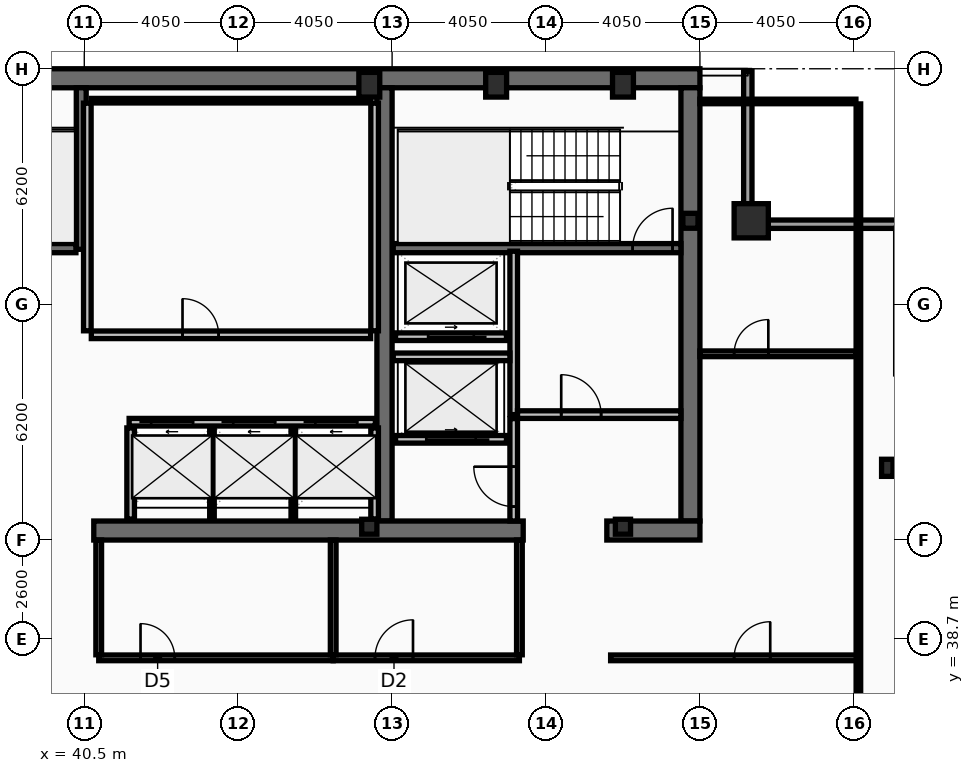
"""IFC4 building model, lengths in metres.
Left out: names, types, materials, properties, quantities, classifications, styles, units other than length and angle.
Written with IfcOpenShell. Run it as: python <this file> out.ifc"""

import sys

from ifc_helpers import new_model, si_unit, direction, frame, frame_2d, origin, origin_2d, place, context, subcontext, project, spatial, rectangle, hollow_rectangle, i_section, extrude, element, fill, save


model = new_model("IFC4")
c1 = context("Model", 3, precision=1e-05, world=origin(), true_north=direction((0.0, 1.0)))
c2 = subcontext(c1, "Body", "Model", "MODEL_VIEW")
j1 = project(units=[si_unit("LENGTHUNIT", "METRE"), si_unit("PLANEANGLEUNIT", "RADIAN")], contexts=[c1])
p1 = place(None, origin())
s1 = spatial("IfcSite", under=j1, at=p1, CompositionType="ELEMENT")
p2 = place(p1, origin())
s2 = spatial("IfcBuilding", under=s1, at=p2, CompositionType="ELEMENT")
p3 = place(p2, frame((0.0, 0.0, 321.8)))
s3 = spatial("IfcBuildingStorey", under=s2, at=p3, CompositionType="ELEMENT", Elevation=321.8)
p4 = place(p3, frame((16.2, 53.45, 0.0), z_axis=(0.0, 0.0, 1.0), x_axis=(1.0, 0.0, 0.0)))
e1 = element("IfcWall", 1, at=p4, inside=s3, PredefinedType="SHEAR", context=c2, shape_type="SweptSolid", body=[
    extrude(rectangle(XDim=40.5, YDim=0.5, at=frame_2d((20.25, 0.0))), origin(), (0.0, 0.0, 1.0), 3.44),
])
p5 = place(p3, frame((56.45, 53.2, 0.0), z_axis=(0.0, 0.0, 1.0), x_axis=(0.0, -1.0, 0.0)))
e2 = element("IfcWall", 2, at=p5, inside=s3, PredefinedType="SHEAR", context=c2, shape_type="SweptSolid", body=[
    extrude(rectangle(XDim=11.4, YDim=0.5, at=frame_2d((5.7, 0.0))), origin(), (0.0, 0.0, 1.0), 3.44),
])
p6 = place(p3, frame((48.4, 41.8, 0.0), z_axis=(0.0, 0.0, 1.0), x_axis=(0.0, 1.0, 0.0)))
e3 = element("IfcWall", 3, at=p6, inside=s3, PredefinedType="SHEAR", context=c2, shape_type="SweptSolid", body=[
    extrude(rectangle(XDim=11.4, YDim=0.4, at=frame_2d((5.7, 0.0))), origin(), (0.0, 0.0, 1.0), 3.44),
])
p7 = place(p3, frame((52.05, 41.55, 0.0), z_axis=(0.0, 0.0, 1.0), x_axis=(-1.0, 0.0, 0.0)))
e4 = element("IfcWall", 4, at=p7, inside=s3, PredefinedType="SHEAR", context=c2, shape_type="SweptSolid", body=[
    extrude(rectangle(XDim=11.3, YDim=0.5, at=frame_2d((5.65, 0.0))), origin(), (0.0, 0.0, 1.0), 3.44),
])
p8 = place(p3, frame((56.7, 41.55, 0.0), z_axis=(0.0, 0.0, 1.0), x_axis=(-1.0, 0.0, 0.0)))
e5 = element("IfcWall", 5, at=p8, inside=s3, PredefinedType="SHEAR", context=c2, shape_type="SweptSolid", body=[
    extrude(rectangle(XDim=2.45, YDim=0.5, at=frame_2d((1.225, 0.0))), origin(), (0.0, 0.0, 1.0), 3.44),
])
p9 = place(p3, frame((40.42, 48.95, 0.0), z_axis=(0.0, 0.0, 1.0), x_axis=(0.0, 1.0, 0.0)))
e6 = element("IfcWall", 6, at=p9, inside=s3, PredefinedType="SHEAR", context=c2, shape_type="SweptSolid", body=[
    extrude(rectangle(XDim=4.25, YDim=0.26, at=frame_2d((2.125, 0.0))), origin(), (0.0, 0.0, 1.0), 3.44),
])
p10 = place(p3, frame((48.63, 48.98, 0.0), z_axis=(0.0, 0.0, 1.0), x_axis=(1.0, 0.0, 0.0)))
e7 = element("IfcWall", 7, at=p10, inside=s3, PredefinedType="SHEAR", context=c2, shape_type="SweptSolid", body=[
    extrude(rectangle(XDim=7.57, YDim=0.24, at=frame_2d((3.785, 0.0))), origin(), (0.0, 0.0, 1.0), 3.44),
])
p11 = place(p10, frame((6.3, 0.0, 0.0)))
e8 = element("IfcOpeningElement", 8, at=p11, cuts=e7, PredefinedType="OPENING", context=c2, shape_type="SweptSolid", body=[
    extrude(rectangle(XDim=1.05, YDim=2.15, at=frame_2d((0.525, 1.075))), frame((0.0, 0.13, 0.0), z_axis=(0.0, -1.0, 0.0), x_axis=(1.0, 0.0, 0.0)), (0.0, 0.0, 1.0), 0.26),
])
p12 = place(p3, frame((32.72, 48.98, 0.0), z_axis=(0.0, 0.0, 1.0), x_axis=(1.0, 0.0, 0.0)))
e9 = element("IfcWall", 9, at=p12, inside=s3, PredefinedType="SHEAR", context=c2, shape_type="SweptSolid", body=[
    extrude(rectangle(XDim=7.56, YDim=0.24, at=frame_2d((3.78, 0.0))), origin(), (0.0, 0.0, 1.0), 3.44),
])
p13 = place(p12, frame((0.22, 0.0, 0.0)))
e10 = element("IfcOpeningElement", 10, at=p13, cuts=e9, PredefinedType="OPENING", context=c2, shape_type="SweptSolid", body=[
    extrude(rectangle(XDim=1.05, YDim=2.15, at=frame_2d((0.525, 1.075))), frame((0.0, 0.13, 0.0), z_axis=(0.0, -1.0, 0.0), x_axis=(1.0, 0.0, 0.0)), (0.0, 0.0, 1.0), 0.26),
])
p14 = place(p3, frame((58.05, 49.7, 0.0), z_axis=(0.0, 0.0, 1.0), x_axis=(1.0, 0.0, 0.0)))
e11 = element("IfcColumn", 11, at=p14, inside=s3, PredefinedType="COLUMN", context=c2, shape_type="SweptSolid", body=[
    extrude(hollow_rectangle(XDim=0.9, YDim=0.9, WallThickness=0.05, at=origin_2d()), origin(), (0.0, 0.0, 1.0), 3.6),
])
for number, where, z_axis, x_axis in (
    (12, (48.0, 53.28, 0.0), (0.0, 0.0, 1.0), (1.0, 0.0, 0.0)),
    (13, (51.337, 53.28, 0.0), (0.0, 0.0, 1.0), (1.0, 0.0, 0.0)),
    (14, (54.675, 53.28, 0.0), (0.0, 0.0, 1.0), (1.0, 0.0, 0.0)),
):
    element("IfcColumn", number, at=place(p3, frame(where, z_axis=z_axis, x_axis=x_axis)), inside=s3, PredefinedType="COLUMN", context=c2, shape_type="SweptSolid", body=[
        extrude(hollow_rectangle(XDim=0.55, YDim=0.65, WallThickness=0.04, at=origin_2d()), origin(), (0.0, 0.0, 1.0), 3.6),
    ])
p15 = place(p3, frame((61.63, 43.2, 0.0), z_axis=(0.0, 0.0, 1.0), x_axis=(1.0, 0.0, 0.0)))
e15 = element("IfcColumn", 15, at=p15, inside=s3, PredefinedType="COLUMN", context=c2, shape_type="SweptSolid", body=[
    extrude(i_section(OverallWidth=0.3, OverallDepth=0.45, WebThickness=0.014, FlangeThickness=0.026, at=origin_2d()), origin(), (0.0, 0.0, 1.0), 3.6),
])
for number, where, z_axis, x_axis in (
    (16, (56.45, 49.7, 0.0), (0.0, 0.0, 1.0), (1.0, 0.0, 0.0)),
    (17, (48.0, 41.65, 0.0), (0.0, 0.0, 1.0), (1.0, 0.0, 0.0)),
    (18, (54.675, 41.65, 0.0), (0.0, 0.0, 1.0), (1.0, 0.0, 0.0)),
):
    element("IfcColumn", number, at=place(p3, frame(where, z_axis=z_axis, x_axis=x_axis)), inside=s3, PredefinedType="COLUMN", context=c2, shape_type="SweptSolid", body=[
        extrude(i_section(OverallWidth=0.399, OverallDepth=0.393, WebThickness=0.023, FlangeThickness=0.037, at=origin_2d()), origin(), (0.0, 0.0, 1.0), 3.6),
    ])
p16 = place(p3, frame((57.96, 53.63, 0.0), z_axis=(0.0, 0.0, 1.0), x_axis=(0.0, -1.0, 0.0)))
e19 = element("IfcWall", 19, at=p16, inside=s3, PredefinedType="SOLIDWALL", context=c2, shape_type="SweptSolid", body=[
    extrude(rectangle(XDim=3.91, YDim=0.22, at=frame_2d((1.955, 0.0))), origin(), (0.0, 0.0, 1.0), 2.88),
])
p17 = place(p3, frame((57.85, 49.61, 0.0), z_axis=(0.0, 0.0, 1.0), x_axis=(1.0, 0.0, 0.0)))
e20 = element("IfcWall", 20, at=p17, inside=s3, PredefinedType="SOLIDWALL", context=c2, shape_type="SweptSolid", body=[
    extrude(rectangle(XDim=4.22, YDim=0.22, at=frame_2d((2.11, 0.0))), origin(), (0.0, 0.0, 1.0), 2.88),
])
p18 = place(p3, frame((41.68, 44.4, 0.0), z_axis=(0.0, 0.0, 1.0), x_axis=(1.0, 0.0, 0.0)))
e21 = element("IfcWall", 21, at=p18, inside=s3, PredefinedType="PARTITIONING", context=c2, shape_type="SweptSolid", body=[
    extrude(rectangle(XDim=6.48, YDim=0.2, at=frame_2d((3.24, 0.0))), origin(), (0.0, 0.0, 1.0), 3.44),
])
p19 = place(p18, frame((0.58, 0.0, 0.0)))
e22 = element("IfcOpeningElement", 22, at=p19, cuts=e21, PredefinedType="OPENING", context=c2, shape_type="SweptSolid", body=[
    extrude(rectangle(XDim=1.1, YDim=2.18, at=frame_2d((0.55, 1.09))), frame((0.0, 0.11, 0.0), z_axis=(0.0, -1.0, 0.0), x_axis=(1.0, 0.0, 0.0)), (0.0, 0.0, 1.0), 0.22),
])
p20 = place(p18, frame((2.74, 0.0, 0.0)))
e23 = element("IfcOpeningElement", 23, at=p20, cuts=e21, PredefinedType="OPENING", context=c2, shape_type="SweptSolid", body=[
    extrude(rectangle(XDim=1.1, YDim=2.18, at=frame_2d((0.55, 1.09))), frame((0.0, 0.11, 0.0), z_axis=(0.0, -1.0, 0.0), x_axis=(1.0, 0.0, 0.0)), (0.0, 0.0, 1.0), 0.22),
])
p21 = place(p18, frame((4.9, 0.0, 0.0)))
e24 = element("IfcOpeningElement", 24, at=p21, cuts=e21, PredefinedType="OPENING", context=c2, shape_type="SweptSolid", body=[
    extrude(rectangle(XDim=1.1, YDim=2.18, at=frame_2d((0.55, 1.09))), frame((0.0, 0.11, 0.0), z_axis=(0.0, -1.0, 0.0), x_axis=(1.0, 0.0, 0.0)), (0.0, 0.0, 1.0), 0.22),
])
p22 = place(p3, frame((51.61, 43.95, 0.0), z_axis=(0.0, 0.0, 1.0), x_axis=(-1.0, 0.0, 0.0)))
e25 = element("IfcWall", 25, at=p22, inside=s3, PredefinedType="PARTITIONING", context=c2, shape_type="SweptSolid", body=[
    extrude(rectangle(XDim=2.92, YDim=0.2, at=frame_2d((1.46, 0.0))), origin(), (0.0, 0.0, 1.0), 3.44),
])
p23 = place(p22, frame((0.81, 0.0, 0.0)))
e26 = element("IfcOpeningElement", 26, at=p23, cuts=e25, PredefinedType="OPENING", context=c2, shape_type="SweptSolid", body=[
    extrude(rectangle(XDim=1.3, YDim=2.18, at=frame_2d((0.65, 1.09))), frame((0.0, 0.11, 0.0), z_axis=(0.0, -1.0, 0.0), x_axis=(1.0, 0.0, 0.0)), (0.0, 0.0, 1.0), 0.22),
])
p24 = place(p3, frame((51.61, 46.65, 0.0), z_axis=(0.0, 0.0, 1.0), x_axis=(-1.0, 0.0, 0.0)))
e27 = element("IfcWall", 27, at=p24, inside=s3, PredefinedType="PARTITIONING", context=c2, shape_type="SweptSolid", body=[
    extrude(rectangle(XDim=2.92, YDim=0.2, at=frame_2d((1.46, 0.0))), origin(), (0.0, 0.0, 1.0), 3.44),
])
p25 = place(p24, frame((0.86, 0.0, 0.0)))
e28 = element("IfcOpeningElement", 28, at=p25, cuts=e27, PredefinedType="OPENING", context=c2, shape_type="SweptSolid", body=[
    extrude(rectangle(XDim=1.2, YDim=2.18, at=frame_2d((0.6, 1.09))), frame((0.0, 0.11, 0.0), z_axis=(0.0, -1.0, 0.0), x_axis=(1.0, 0.0, 0.0)), (0.0, 0.0, 1.0), 0.22),
])
p26 = place(p3, frame((51.8, 44.6, 0.0), z_axis=(0.0, 0.0, 1.0), x_axis=(0.0, 1.0, 0.0)))
e29 = element("IfcWall", 29, at=p26, inside=s3, PredefinedType="PARTITIONING", context=c2, shape_type="SweptSolid", body=[
    extrude(rectangle(XDim=4.3, YDim=0.2, at=frame_2d((2.15, 0.0))), origin(), (0.0, 0.0, 1.0), 3.44),
])
p27 = place(p3, frame((51.9, 44.6, 0.0), z_axis=(0.0, 0.0, 1.0), x_axis=(1.0, 0.0, 0.0)))
e30 = element("IfcWall", 30, at=p27, inside=s3, PredefinedType="PARTITIONING", context=c2, shape_type="SweptSolid", body=[
    extrude(rectangle(XDim=4.3, YDim=0.2, at=frame_2d((2.15, 0.0))), origin(), (0.0, 0.0, 1.0), 3.44),
])
p28 = place(p27, frame((1.15, 0.0, 0.0)))
e31 = element("IfcOpeningElement", 31, at=p28, cuts=e30, PredefinedType="OPENING", context=c2, shape_type="SweptSolid", body=[
    extrude(rectangle(XDim=1.05, YDim=2.15, at=frame_2d((0.525, 1.075))), frame((0.0, 0.11, 0.0), z_axis=(0.0, -1.0, 0.0), x_axis=(1.0, 0.0, 0.0)), (0.0, 0.0, 1.0), 0.22),
])
p29 = place(p3, frame((48.63, 46.12, 0.0), z_axis=(0.0, 0.0, 1.0), x_axis=(1.0, 0.0, 0.0)))
e32 = element("IfcWall", 32, at=p29, inside=s3, PredefinedType="PARTITIONING", context=c2, shape_type="SweptSolid", body=[
    extrude(rectangle(XDim=3.07, YDim=0.2, at=frame_2d((1.535, 0.0))), origin(), (0.0, 0.0, 1.0), 3.44),
])
p30 = place(p3, frame((51.8, 41.8, 0.0), z_axis=(0.0, 0.0, 1.0), x_axis=(0.0, 1.0, 0.0)))
e33 = element("IfcWall", 33, at=p30, inside=s3, PredefinedType="PARTITIONING", context=c2, shape_type="SweptSolid", body=[
    extrude(rectangle(XDim=2.695, YDim=0.2, at=frame_2d((1.348, 0.0))), origin(), (0.0, 0.0, 1.0), 3.44),
])
p31 = place(p30, frame((0.38, 0.0, 0.0)))
e34 = element("IfcOpeningElement", 34, at=p31, cuts=e33, PredefinedType="OPENING", context=c2, shape_type="SweptSolid", body=[
    extrude(rectangle(XDim=1.05, YDim=2.15, at=frame_2d((0.525, 1.075))), frame((0.0, 0.11, 0.0), z_axis=(0.0, -1.0, 0.0), x_axis=(1.0, 0.0, 0.0)), (0.0, 0.0, 1.0), 0.22),
])
for number, where, z_axis, x_axis in (
    (35, (40.58, 46.805, 0.0), (0.0, 0.0, 1.0), (0.0, 1.0, 0.0)),
    (36, (48.14, 46.805, 0.0), (0.0, 0.0, 1.0), (0.0, 1.0, 0.0)),
):
    element("IfcWall", number, at=place(p3, frame(where, z_axis=z_axis, x_axis=x_axis)), inside=s3, PredefinedType="PARTITIONING", context=c2, shape_type="SweptSolid", body=[
        extrude(rectangle(XDim=5.99, YDim=0.2, at=frame_2d((2.995, 0.0))), origin(), (0.0, 0.0, 1.0), 3.44),
    ])
p32 = place(p3, frame((40.685, 52.86, 0.0), z_axis=(0.0, 0.0, 1.0), x_axis=(1.0, 0.0, 0.0)))
e37 = element("IfcWall", 37, at=p32, inside=s3, PredefinedType="PARTITIONING", context=c2, shape_type="SweptSolid", body=[
    extrude(rectangle(XDim=7.35, YDim=0.12, at=frame_2d((3.675, 0.0))), origin(), (0.0, 0.0, 1.0), 3.44),
])
p33 = place(p3, frame((40.685, 46.7, 0.0), z_axis=(0.0, 0.0, 1.0), x_axis=(1.0, 0.0, 0.0)))
e38 = element("IfcWall", 38, at=p33, inside=s3, PredefinedType="PARTITIONING", context=c2, shape_type="SweptSolid", body=[
    extrude(rectangle(XDim=7.35, YDim=0.2, at=frame_2d((3.675, 0.0))), origin(), (0.0, 0.0, 1.0), 3.44),
])
p34 = place(p33, frame((2.4, 0.0, 0.0)))
e39 = element("IfcOpeningElement", 39, at=p34, cuts=e38, PredefinedType="OPENING", context=c2, shape_type="SweptSolid", body=[
    extrude(rectangle(XDim=0.95, YDim=2.1, at=frame_2d((0.475, 1.05))), frame((0.0, 0.11, 0.0), z_axis=(0.0, -1.0, 0.0), x_axis=(1.0, 0.0, 0.0)), (0.0, 0.0, 1.0), 0.22),
])
for number, where, z_axis, x_axis in (
    (40, (41.72, 41.85, 0.0), (0.0, 0.0, 1.0), (0.0, 1.0, 0.0)),
    (41, (48.14, 41.85, 0.0), (0.0, 0.0, 1.0), (0.0, 1.0, 0.0)),
):
    element("IfcWall", number, at=place(p3, frame(where, z_axis=z_axis, x_axis=x_axis)), inside=s3, PredefinedType="PARTITIONING", context=c2, shape_type="SweptSolid", body=[
        extrude(rectangle(XDim=2.4, YDim=0.2, at=frame_2d((1.2, 0.0))), origin(), (0.0, 0.0, 1.0), 3.44),
    ])
for number, where, z_axis, x_axis in (
    (42, (43.86, 41.85, 0.0), (0.0, 0.0, 1.0), (0.0, 1.0, 0.0)),
    (43, (46.0, 41.85, 0.0), (0.0, 0.0, 1.0), (0.0, 1.0, 0.0)),
):
    element("IfcWall", number, at=place(p3, frame(where, z_axis=z_axis, x_axis=x_axis)), inside=s3, PredefinedType="PARTITIONING", context=c2, shape_type="SweptSolid", body=[
        extrude(rectangle(XDim=2.4, YDim=0.12, at=frame_2d((1.2, 0.0))), origin(), (0.0, 0.0, 1.0), 3.44),
    ])
p35 = place(p3, frame((40.88, 38.2, 0.0), z_axis=(0.0, 0.0, 1.0), x_axis=(1.0, 0.0, 0.0)))
e44 = element("IfcWall", 44, at=p35, inside=s3, PredefinedType="PARTITIONING", context=c2, shape_type="SweptSolid", body=[
    extrude(rectangle(XDim=6.17, YDim=0.15, at=frame_2d((3.085, 0.0))), origin(), (0.0, 0.0, 1.0), 3.44),
])
p36 = place(p35, frame((1.1, 0.0, 0.0)))
e45 = element("IfcOpeningElement", 45, at=p36, cuts=e44, PredefinedType="OPENING", context=c2, shape_type="SweptSolid", body=[
    extrude(rectangle(XDim=0.9, YDim=2.05, at=frame_2d((0.45, 1.025))), frame((0.0, 0.085, 0.0), z_axis=(0.0, -1.0, 0.0), x_axis=(1.0, 0.0, 0.0)), (0.0, 0.0, 1.0), 0.17),
])
p37 = place(p3, frame((47.05, 38.2, 0.0), z_axis=(0.0, 0.0, 1.0), x_axis=(1.0, 0.0, 0.0)))
e46 = element("IfcWall", 46, at=p37, inside=s3, PredefinedType="PARTITIONING", context=c2, shape_type="SweptSolid", body=[
    extrude(rectangle(XDim=4.9, YDim=0.15, at=frame_2d((2.45, 0.0))), origin(), (0.0, 0.0, 1.0), 2.83),
])
p38 = place(p37, frame((1.1, 0.0, 0.0)))
e47 = element("IfcOpeningElement", 47, at=p38, cuts=e46, PredefinedType="OPENING", context=c2, shape_type="SweptSolid", body=[
    extrude(rectangle(XDim=1.0, YDim=2.05, at=frame_2d((0.5, 1.025))), frame((0.0, 0.085, 0.0), z_axis=(0.0, -1.0, 0.0), x_axis=(1.0, 0.0, 0.0)), (0.0, 0.0, 1.0), 0.17),
])
for number, where, z_axis, x_axis in (
    (48, (40.88, 38.28, 0.0), (0.0, 0.0, 1.0), (0.0, 1.0, 0.0)),
    (49, (47.05, 38.28, 0.0), (0.0, 0.0, 1.0), (0.0, 1.0, 0.0)),
    (50, (51.95, 38.28, 0.0), (0.0, 0.0, 1.0), (0.0, 1.0, 0.0)),
):
    element("IfcWall", number, at=place(p3, frame(where, z_axis=z_axis, x_axis=x_axis)), inside=s3, PredefinedType="PARTITIONING", context=c2, shape_type="SweptSolid", body=[
        extrude(rectangle(XDim=3.02, YDim=0.15, at=frame_2d((1.51, 0.0))), origin(), (0.0, 0.0, 1.0), 3.44),
    ])
p39 = place(p3, frame((54.35, 38.2, 0.0), z_axis=(0.0, 0.0, 1.0), x_axis=(1.0, 0.0, 0.0)))
e51 = element("IfcWall", 51, at=p39, inside=s3, PredefinedType="PARTITIONING", context=c2, shape_type="SweptSolid", body=[
    extrude(rectangle(XDim=6.52, YDim=0.15, at=frame_2d((3.26, 0.0))), origin(), (0.0, 0.0, 1.0), 2.83),
])
p40 = place(p39, frame((3.25, 0.0, 0.0)))
e52 = element("IfcOpeningElement", 52, at=p40, cuts=e51, PredefinedType="OPENING", context=c2, shape_type="SweptSolid", body=[
    extrude(rectangle(XDim=0.95, YDim=2.05, at=frame_2d((0.475, 1.025))), frame((0.0, 0.085, 0.0), z_axis=(0.0, -1.0, 0.0), x_axis=(1.0, 0.0, 0.0)), (0.0, 0.0, 1.0), 0.17),
])
p41 = place(p3, frame((56.7, 46.2, 0.0), z_axis=(0.0, 0.0, 1.0), x_axis=(1.0, 0.0, 0.0)))
e53 = element("IfcWall", 53, at=p41, inside=s3, PredefinedType="PARTITIONING", context=c2, shape_type="SweptSolid", body=[
    extrude(rectangle(XDim=4.105, YDim=0.15, at=frame_2d((2.052, 0.0))), origin(), (0.0, 0.0, 1.0), 2.88),
])
p42 = place(p41, frame((0.9, 0.0, 0.0)))
e54 = element("IfcOpeningElement", 54, at=p42, cuts=e53, PredefinedType="OPENING", context=c2, shape_type="SweptSolid", body=[
    extrude(rectangle(XDim=0.9, YDim=2.05, at=frame_2d((0.45, 1.025))), frame((0.0, 0.085, 0.0), z_axis=(0.0, -1.0, 0.0), x_axis=(1.0, 0.0, 0.0)), (0.0, 0.0, 1.0), 0.17),
])
p43 = place(p3, frame((60.87, 10.665, 0.0), z_axis=(0.0, 0.0, 1.0), x_axis=(0.0, 1.0, 0.0)))
e55 = element("IfcWall", 55, at=p43, inside=s3, PredefinedType="PARTITIONING", context=c2, shape_type="SweptSolid", body=[
    extrude(rectangle(XDim=42.11, YDim=0.12, at=frame_2d((21.055, 0.0))), origin(), (0.0, 0.0, 1.0), 2.83),
])
p44 = place(p3, frame((56.7, 52.84, 0.0), z_axis=(0.0, 0.0, 1.0), x_axis=(1.0, 0.0, 0.0)))
e56 = element("IfcWall", 56, at=p44, inside=s3, PredefinedType="PARTITIONING", context=c2, shape_type="SweptSolid", body=[
    extrude(rectangle(XDim=4.105, YDim=0.12, at=frame_2d((2.052, 0.0))), origin(), (0.0, 0.0, 1.0), 3.44),
])
p45 = place(p11, origin())
e57 = element("IfcDoor", 57, at=p45, inside=s3, OperationType="SINGLE_SWING_RIGHT", PredefinedType="DOOR", context=c2, shape_type="SweptSolid", body=[
    extrude(rectangle(XDim=1.05, YDim=2.15, at=frame_2d((0.525, 1.075))), frame((0.0, 0.025, 0.0), z_axis=(0.0, -1.0, 0.0), x_axis=(1.0, 0.0, 0.0)), (0.0, 0.0, 1.0), 0.05),
])
fill(e8, e57)
p46 = place(p19, origin())
e58 = element("IfcDoor", 58, at=p46, inside=s3, OperationType="SLIDING_TO_LEFT", PredefinedType="DOOR", context=c2, shape_type="SweptSolid", body=[
    extrude(rectangle(XDim=1.1, YDim=2.18, at=frame_2d((0.55, 1.09))), frame((0.0, 0.025, 0.0), z_axis=(0.0, -1.0, 0.0), x_axis=(1.0, 0.0, 0.0)), (0.0, 0.0, 1.0), 0.05),
])
fill(e22, e58)
p47 = place(p20, origin())
e59 = element("IfcDoor", 59, at=p47, inside=s3, OperationType="SLIDING_TO_LEFT", PredefinedType="DOOR", context=c2, shape_type="SweptSolid", body=[
    extrude(rectangle(XDim=1.1, YDim=2.18, at=frame_2d((0.55, 1.09))), frame((0.0, 0.025, 0.0), z_axis=(0.0, -1.0, 0.0), x_axis=(1.0, 0.0, 0.0)), (0.0, 0.0, 1.0), 0.05),
])
fill(e23, e59)
p48 = place(p21, origin())
e60 = element("IfcDoor", 60, at=p48, inside=s3, OperationType="SLIDING_TO_LEFT", PredefinedType="DOOR", context=c2, shape_type="SweptSolid", body=[
    extrude(rectangle(XDim=1.1, YDim=2.18, at=frame_2d((0.55, 1.09))), frame((0.0, 0.025, 0.0), z_axis=(0.0, -1.0, 0.0), x_axis=(1.0, 0.0, 0.0)), (0.0, 0.0, 1.0), 0.05),
])
fill(e24, e60)
p49 = place(p23, origin())
e61 = element("IfcDoor", 61, at=p49, inside=s3, OperationType="SLIDING_TO_LEFT", PredefinedType="DOOR", context=c2, shape_type="SweptSolid", body=[
    extrude(rectangle(XDim=1.3, YDim=2.18, at=frame_2d((0.65, 1.09))), frame((0.0, 0.025, 0.0), z_axis=(0.0, -1.0, 0.0), x_axis=(1.0, 0.0, 0.0)), (0.0, 0.0, 1.0), 0.05),
])
fill(e26, e61)
p50 = place(p25, origin())
e62 = element("IfcDoor", 62, at=p50, inside=s3, OperationType="SLIDING_TO_LEFT", PredefinedType="DOOR", context=c2, shape_type="SweptSolid", body=[
    extrude(rectangle(XDim=1.2, YDim=2.18, at=frame_2d((0.6, 1.09))), frame((0.0, 0.025, 0.0), z_axis=(0.0, -1.0, 0.0), x_axis=(1.0, 0.0, 0.0)), (0.0, 0.0, 1.0), 0.05),
])
fill(e28, e62)
p51 = place(p28, origin())
e63 = element("IfcDoor", 63, at=p51, inside=s3, OperationType="SINGLE_SWING_LEFT", PredefinedType="DOOR", context=c2, shape_type="SweptSolid", body=[
    extrude(rectangle(XDim=1.05, YDim=2.15, at=frame_2d((0.525, 1.075))), frame((0.0, 0.025, 0.0), z_axis=(0.0, -1.0, 0.0), x_axis=(1.0, 0.0, 0.0)), (0.0, 0.0, 1.0), 0.05),
])
fill(e31, e63)
p52 = place(p31, origin())
e64 = element("IfcDoor", 64, at=p52, inside=s3, OperationType="SINGLE_SWING_RIGHT", PredefinedType="DOOR", context=c2, shape_type="SweptSolid", body=[
    extrude(rectangle(XDim=1.05, YDim=2.15, at=frame_2d((0.525, 1.075))), frame((0.0, 0.025, 0.0), z_axis=(0.0, -1.0, 0.0), x_axis=(1.0, 0.0, 0.0)), (0.0, 0.0, 1.0), 0.05),
])
fill(e34, e64)
p53 = place(p34, origin())
e65 = element("IfcDoor", 65, at=p53, inside=s3, OperationType="SINGLE_SWING_LEFT", PredefinedType="DOOR", context=c2, shape_type="SweptSolid", body=[
    extrude(rectangle(XDim=0.95, YDim=2.1, at=frame_2d((0.475, 1.05))), frame((0.0, 0.025, 0.0), z_axis=(0.0, -1.0, 0.0), x_axis=(1.0, 0.0, 0.0)), (0.0, 0.0, 1.0), 0.05),
])
fill(e39, e65)
p54 = place(p36, origin())
e66 = element("IfcDoor", 66, at=p54, inside=s3, OperationType="SINGLE_SWING_LEFT", PredefinedType="DOOR", context=c2, shape_type="SweptSolid", body=[
    extrude(rectangle(XDim=0.9, YDim=2.05, at=frame_2d((0.45, 1.025))), frame((0.0, 0.025, 0.0), z_axis=(0.0, -1.0, 0.0), x_axis=(1.0, 0.0, 0.0)), (0.0, 0.0, 1.0), 0.05),
])
fill(e45, e66)
p55 = place(p38, origin())
e67 = element("IfcDoor", 67, at=p55, inside=s3, OperationType="SINGLE_SWING_RIGHT", PredefinedType="DOOR", context=c2, shape_type="SweptSolid", body=[
    extrude(rectangle(XDim=1.0, YDim=2.05, at=frame_2d((0.5, 1.025))), frame((0.0, 0.025, 0.0), z_axis=(0.0, -1.0, 0.0), x_axis=(1.0, 0.0, 0.0)), (0.0, 0.0, 1.0), 0.05),
])
fill(e47, e67)
p56 = place(p40, origin())
e68 = element("IfcDoor", 68, at=p56, inside=s3, OperationType="SINGLE_SWING_RIGHT", PredefinedType="DOOR", context=c2, shape_type="SweptSolid", body=[
    extrude(rectangle(XDim=0.95, YDim=2.05, at=frame_2d((0.475, 1.025))), frame((0.0, 0.025, 0.0), z_axis=(0.0, -1.0, 0.0), x_axis=(1.0, 0.0, 0.0)), (0.0, 0.0, 1.0), 0.05),
])
fill(e52, e68)
p57 = place(p42, origin())
e69 = element("IfcDoor", 69, at=p57, inside=s3, OperationType="SINGLE_SWING_RIGHT", PredefinedType="DOOR", context=c2, shape_type="SweptSolid", body=[
    extrude(rectangle(XDim=0.9, YDim=2.05, at=frame_2d((0.45, 1.025))), frame((0.0, 0.025, 0.0), z_axis=(0.0, -1.0, 0.0), x_axis=(1.0, 0.0, 0.0)), (0.0, 0.0, 1.0), 0.05),
])
fill(e54, e69)
save(model, sys.argv[1])
